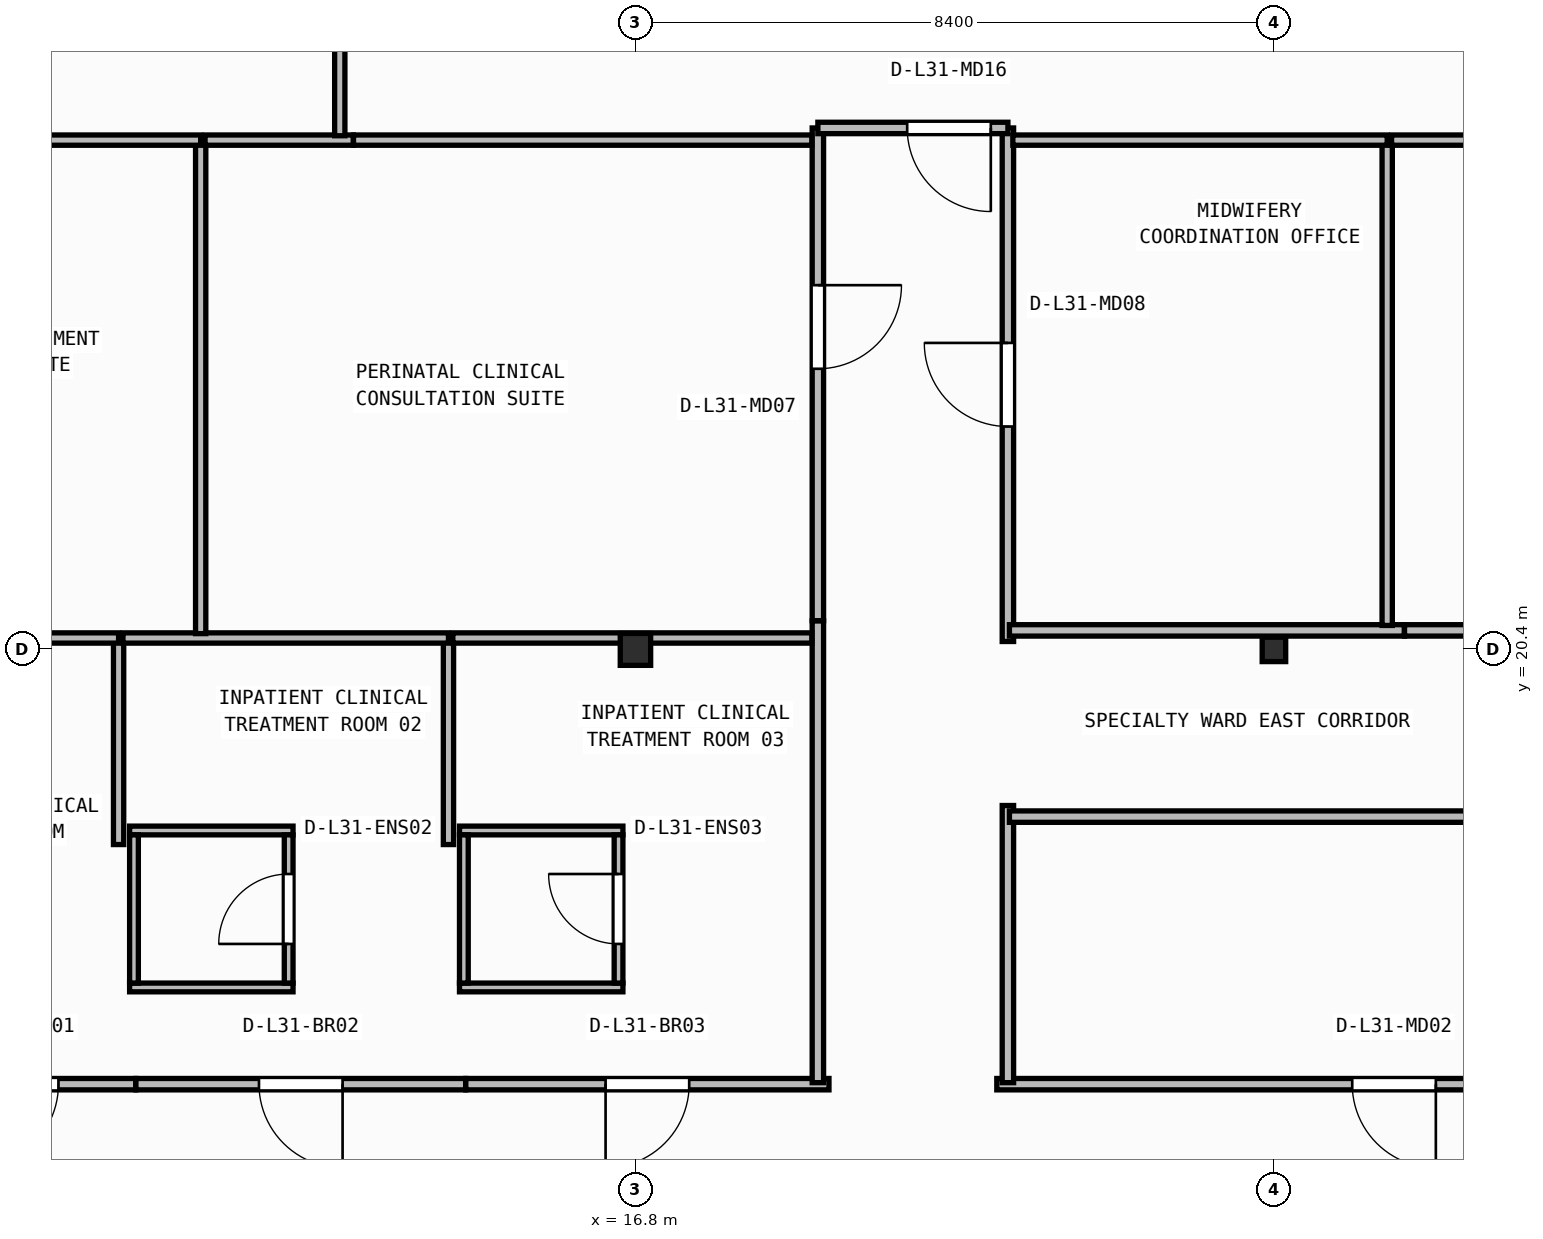
"""IFC4 building model, lengths in metres.
Left out: names, types, materials, properties, quantities, classifications, styles, units other than length and angle.
Written with IfcOpenShell. Run it as: python <this file> out.ifc"""

import sys

from ifc_helpers import new_model, si_unit, direction, frame, frame_2d, origin, origin_2d, place, context, subcontext, project, spatial, rectangle, i_section, extrude, element, fill, save


model = new_model("IFC4")
c1 = context("Model", 3, precision=1e-05, world=origin(), true_north=direction((0.0, 1.0)))
c2 = subcontext(c1, "Body", "Model", "MODEL_VIEW")
j1 = project(units=[si_unit("LENGTHUNIT", "METRE"), si_unit("PLANEANGLEUNIT", "RADIAN")], contexts=[c1])
p1 = place(None, origin())
s1 = spatial("IfcSite", under=j1, at=p1, CompositionType="ELEMENT")
p2 = place(p1, origin())
s2 = spatial("IfcBuilding", under=s1, at=p2, CompositionType="ELEMENT")
p3 = place(p2, frame((0.0, 0.0, 127.05)))
s3 = spatial("IfcBuildingStorey", under=s2, at=p3, CompositionType="ELEMENT", Elevation=127.05)
p4 = place(p3, frame((16.8, 20.4, 0.0), z_axis=(0.0, 0.0, 1.0), x_axis=(1.0, 0.0, 0.0)))
e1 = element("IfcColumn", 1, at=p4, inside=s3, PredefinedType="COLUMN", context=c2, shape_type="SweptSolid", body=[
    extrude(i_section(OverallWidth=0.4, OverallDepth=0.42, WebThickness=0.025, FlangeThickness=0.04, at=origin_2d()), origin(), (0.0, 0.0, 1.0), 3.95),
])
p5 = place(p3, frame((25.2, 20.4, 0.0), z_axis=(0.0, 0.0, 1.0), x_axis=(1.0, 0.0, 0.0)))
e2 = element("IfcColumn", 2, at=p5, inside=s3, PredefinedType="COLUMN", context=c2, shape_type="SweptSolid", body=[
    extrude(i_section(OverallWidth=0.309, OverallDepth=0.321, WebThickness=0.014, FlangeThickness=0.022, FilletRadius=0.017, at=origin_2d()), origin(), (0.0, 0.0, 1.0), 3.95),
])
for number, where, z_axis, x_axis in (
    (3, (10.145, 15.952, 0.0), (0.0, 0.0, 1.0), (1.0, 0.0, 0.0)),
    (4, (10.145, 18.018, 0.0), (0.0, 0.0, 1.0), (1.0, 0.0, 0.0)),
):
    element("IfcWall", number, at=place(p3, frame(where, z_axis=z_axis, x_axis=x_axis)), inside=s3, PredefinedType="PARTITIONING", context=c2, shape_type="SweptSolid", body=[
        extrude(rectangle(XDim=2.15, YDim=0.115, at=frame_2d((1.075, 0.0))), origin(), (0.0, 0.0, 1.0), 3.71),
    ])
p6 = place(p3, frame((10.202, 16.01, 0.0), z_axis=(0.0, 0.0, 1.0), x_axis=(0.0, 1.0, 0.0)))
e5 = element("IfcWall", 5, at=p6, inside=s3, PredefinedType="PARTITIONING", context=c2, shape_type="SweptSolid", body=[
    extrude(rectangle(XDim=1.95, YDim=0.115, at=frame_2d((0.975, 0.0))), origin(), (0.0, 0.0, 1.0), 3.71),
])
p7 = place(p3, frame((12.238, 16.01, 0.0), z_axis=(0.0, 0.0, 1.0), x_axis=(0.0, 1.0, 0.0)))
e6 = element("IfcWall", 6, at=p7, inside=s3, PredefinedType="PARTITIONING", context=c2, shape_type="SweptSolid", body=[
    extrude(rectangle(XDim=1.95, YDim=0.115, at=frame_2d((0.975, 0.0))), origin(), (0.0, 0.0, 1.0), 3.71),
])
p8 = place(p7, frame((0.515, 0.0, 0.0)))
e7 = element("IfcOpeningElement", 7, at=p8, cuts=e6, PredefinedType="OPENING", context=c2, shape_type="SweptSolid", body=[
    extrude(rectangle(XDim=0.92, YDim=2.1, at=frame_2d((0.46, 1.05))), frame((0.0, 0.067, 0.0), z_axis=(0.0, -1.0, 0.0), x_axis=(1.0, 0.0, 0.0)), (0.0, 0.0, 1.0), 0.135),
])
for number, where, z_axis, x_axis in (
    (8, (14.485, 15.952, 0.0), (0.0, 0.0, 1.0), (1.0, 0.0, 0.0)),
    (9, (14.485, 18.018, 0.0), (0.0, 0.0, 1.0), (1.0, 0.0, 0.0)),
):
    element("IfcWall", number, at=place(p3, frame(where, z_axis=z_axis, x_axis=x_axis)), inside=s3, PredefinedType="PARTITIONING", context=c2, shape_type="SweptSolid", body=[
        extrude(rectangle(XDim=2.15, YDim=0.115, at=frame_2d((1.075, 0.0))), origin(), (0.0, 0.0, 1.0), 3.71),
    ])
p9 = place(p3, frame((14.542, 16.01, 0.0), z_axis=(0.0, 0.0, 1.0), x_axis=(0.0, 1.0, 0.0)))
e10 = element("IfcWall", 10, at=p9, inside=s3, PredefinedType="PARTITIONING", context=c2, shape_type="SweptSolid", body=[
    extrude(rectangle(XDim=1.95, YDim=0.115, at=frame_2d((0.975, 0.0))), origin(), (0.0, 0.0, 1.0), 3.71),
])
p10 = place(p3, frame((16.577, 16.01, 0.0), z_axis=(0.0, 0.0, 1.0), x_axis=(0.0, 1.0, 0.0)))
e11 = element("IfcWall", 11, at=p10, inside=s3, PredefinedType="PARTITIONING", context=c2, shape_type="SweptSolid", body=[
    extrude(rectangle(XDim=1.95, YDim=0.115, at=frame_2d((0.975, 0.0))), origin(), (0.0, 0.0, 1.0), 3.71),
])
p11 = place(p10, frame((0.515, 0.0, 0.0)))
e12 = element("IfcOpeningElement", 12, at=p11, cuts=e11, PredefinedType="OPENING", context=c2, shape_type="SweptSolid", body=[
    extrude(rectangle(XDim=0.92, YDim=2.1, at=frame_2d((0.46, 1.05))), frame((0.0, 0.067, 0.0), z_axis=(0.0, -1.0, 0.0), x_axis=(1.0, 0.0, 0.0)), (0.0, 0.0, 1.0), 0.135),
])
p12 = place(p3, frame((10.226, 14.68, 0.0), z_axis=(0.0, 0.0, 1.0), x_axis=(-1.0, 0.0, 0.0)))
e13 = element("IfcWall", 13, at=p12, inside=s3, PredefinedType="PARTITIONING", context=c2, shape_type="SweptSolid", body=[
    extrude(rectangle(XDim=3.134, YDim=0.15, at=frame_2d((1.567, 0.0))), origin(), (0.0, 0.0, 1.0), 3.71),
])
p13 = place(p12, frame((1.017, 0.0, 0.0)))
e14 = element("IfcOpeningElement", 14, at=p13, cuts=e13, PredefinedType="OPENING", context=c2, shape_type="SweptSolid", body=[
    extrude(rectangle(XDim=1.1, YDim=2.1, at=frame_2d((0.55, 1.05))), frame((0.0, 0.085, 0.0), z_axis=(0.0, -1.0, 0.0), x_axis=(1.0, 0.0, 0.0)), (0.0, 0.0, 1.0), 0.17),
])
p14 = place(p3, frame((14.566, 14.68, 0.0), z_axis=(0.0, 0.0, 1.0), x_axis=(-1.0, 0.0, 0.0)))
e15 = element("IfcWall", 15, at=p14, inside=s3, PredefinedType="PARTITIONING", context=c2, shape_type="SweptSolid", body=[
    extrude(rectangle(XDim=4.338, YDim=0.15, at=frame_2d((2.169, 0.0))), origin(), (0.0, 0.0, 1.0), 3.71),
])
p15 = place(p14, frame((1.619, 0.0, 0.0)))
e16 = element("IfcOpeningElement", 16, at=p15, cuts=e15, PredefinedType="OPENING", context=c2, shape_type="SweptSolid", body=[
    extrude(rectangle(XDim=1.1, YDim=2.1, at=frame_2d((0.55, 1.05))), frame((0.0, 0.085, 0.0), z_axis=(0.0, -1.0, 0.0), x_axis=(1.0, 0.0, 0.0)), (0.0, 0.0, 1.0), 0.17),
])
p16 = place(p3, frame((19.346, 14.68, 0.0), z_axis=(0.0, 0.0, 1.0), x_axis=(-1.0, 0.0, 0.0)))
e17 = element("IfcWall", 17, at=p16, inside=s3, PredefinedType="PARTITIONING", context=c2, shape_type="SweptSolid", body=[
    extrude(rectangle(XDim=4.778, YDim=0.15, at=frame_2d((2.389, 0.0))), origin(), (0.0, 0.0, 1.0), 3.71),
])
p17 = place(p16, frame((1.839, 0.0, 0.0)))
e18 = element("IfcOpeningElement", 18, at=p17, cuts=e17, PredefinedType="OPENING", context=c2, shape_type="SweptSolid", body=[
    extrude(rectangle(XDim=1.1, YDim=2.1, at=frame_2d((0.55, 1.05))), frame((0.0, 0.085, 0.0), z_axis=(0.0, -1.0, 0.0), x_axis=(1.0, 0.0, 0.0)), (0.0, 0.0, 1.0), 0.17),
])
p18 = place(p3, frame((32.006, 14.68, 0.0), z_axis=(0.0, 0.0, 1.0), x_axis=(-1.0, 0.0, 0.0)))
e19 = element("IfcWall", 19, at=p18, inside=s3, PredefinedType="PARTITIONING", context=c2, shape_type="SweptSolid", body=[
    extrude(rectangle(XDim=10.452, YDim=0.15, at=frame_2d((5.226, 0.0))), origin(), (0.0, 0.0, 1.0), 3.71),
])
p19 = place(p18, frame((4.676, 0.0, 0.0)))
e20 = element("IfcOpeningElement", 20, at=p19, cuts=e19, PredefinedType="OPENING", context=c2, shape_type="SweptSolid", body=[
    extrude(rectangle(XDim=1.1, YDim=2.1, at=frame_2d((0.55, 1.05))), frame((0.0, 0.085, 0.0), z_axis=(0.0, -1.0, 0.0), x_axis=(1.0, 0.0, 0.0)), (0.0, 0.0, 1.0), 0.17),
])
p20 = place(p3, frame((19.2, 20.776, 0.0), z_axis=(0.0, 0.0, 1.0), x_axis=(0.0, -1.0, 0.0)))
e21 = element("IfcWall", 21, at=p20, inside=s3, PredefinedType="PARTITIONING", context=c2, shape_type="SweptSolid", body=[
    extrude(rectangle(XDim=6.076, YDim=0.15, at=frame_2d((3.038, 0.0))), origin(), (0.0, 0.0, 1.0), 3.71),
])
p21 = place(p3, frame((21.7, 14.7, 0.0), z_axis=(0.0, 0.0, 1.0), x_axis=(0.0, 1.0, 0.0)))
e22 = element("IfcWall", 22, at=p21, inside=s3, PredefinedType="PARTITIONING", context=c2, shape_type="SweptSolid", body=[
    extrude(rectangle(XDim=3.646, YDim=0.15, at=frame_2d((1.823, 0.0))), origin(), (0.0, 0.0, 1.0), 3.71),
])
p22 = place(p3, frame((19.2, 27.26, 0.0), z_axis=(0.0, 0.0, 1.0), x_axis=(0.0, -1.0, 0.0)))
e23 = element("IfcWall", 23, at=p22, inside=s3, PredefinedType="PARTITIONING", context=c2, shape_type="SweptSolid", body=[
    extrude(rectangle(XDim=6.482, YDim=0.15, at=frame_2d((3.241, 0.0))), origin(), (0.0, 0.0, 1.0), 3.71),
])
p23 = place(p22, frame((2.068, 0.0, 0.0)))
e24 = element("IfcOpeningElement", 24, at=p23, cuts=e23, PredefinedType="OPENING", context=c2, shape_type="SweptSolid", body=[
    extrude(rectangle(XDim=1.1, YDim=2.1, at=frame_2d((0.55, 1.05))), frame((0.0, 0.085, 0.0), z_axis=(0.0, -1.0, 0.0), x_axis=(1.0, 0.0, 0.0)), (0.0, 0.0, 1.0), 0.17),
])
p24 = place(p3, frame((21.7, 20.504, 0.0), z_axis=(0.0, 0.0, 1.0), x_axis=(0.0, 1.0, 0.0)))
e25 = element("IfcWall", 25, at=p24, inside=s3, PredefinedType="PARTITIONING", context=c2, shape_type="SweptSolid", body=[
    extrude(rectangle(XDim=6.756, YDim=0.15, at=frame_2d((3.378, 0.0))), origin(), (0.0, 0.0, 1.0), 3.71),
])
p25 = place(p24, frame((2.828, 0.0, 0.0)))
e26 = element("IfcOpeningElement", 26, at=p25, cuts=e25, PredefinedType="OPENING", context=c2, shape_type="SweptSolid", body=[
    extrude(rectangle(XDim=1.1, YDim=2.1, at=frame_2d((0.55, 1.05))), frame((0.0, 0.085, 0.0), z_axis=(0.0, -1.0, 0.0), x_axis=(1.0, 0.0, 0.0)), (0.0, 0.0, 1.0), 0.17),
])
p26 = place(p3, frame((21.7, 27.26, 0.0), z_axis=(0.0, 0.0, 1.0), x_axis=(-1.0, 0.0, 0.0)))
e27 = element("IfcWall", 27, at=p26, inside=s3, PredefinedType="PARTITIONING", context=c2, shape_type="SweptSolid", body=[
    extrude(rectangle(XDim=2.5, YDim=0.15, at=frame_2d((1.25, 0.0))), origin(), (0.0, 0.0, 1.0), 3.71),
])
p27 = place(p26, frame((0.225, 0.0, 0.0)))
e28 = element("IfcOpeningElement", 28, at=p27, cuts=e27, PredefinedType="OPENING", context=c2, shape_type="SweptSolid", body=[
    extrude(rectangle(XDim=1.1, YDim=2.1, at=frame_2d((0.55, 1.05))), frame((0.0, 0.085, 0.0), z_axis=(0.0, -1.0, 0.0), x_axis=(1.0, 0.0, 0.0)), (0.0, 0.0, 1.0), 0.17),
])
p28 = place(p3, frame((21.72, 18.2, 0.0), z_axis=(0.0, 0.0, 1.0), x_axis=(1.0, 0.0, 0.0)))
e29 = element("IfcWall", 29, at=p28, inside=s3, PredefinedType="PARTITIONING", context=c2, shape_type="SweptSolid", body=[
    extrude(rectangle(XDim=10.286, YDim=0.15, at=frame_2d((5.143, 0.0))), origin(), (0.0, 0.0, 1.0), 3.71),
])
p29 = place(p3, frame((26.916, 20.65, 0.0), z_axis=(0.0, 0.0, 1.0), x_axis=(-1.0, 0.0, 0.0)))
e30 = element("IfcWall", 30, at=p29, inside=s3, PredefinedType="PARTITIONING", context=c2, shape_type="SweptSolid", body=[
    extrude(rectangle(XDim=5.196, YDim=0.15, at=frame_2d((2.598, 0.0))), origin(), (0.0, 0.0, 1.0), 3.083),
])
p30 = place(p3, frame((32.286, 20.65, 0.0), z_axis=(0.0, 0.0, 1.0), x_axis=(-1.0, 0.0, 0.0)))
e31 = element("IfcWall", 31, at=p30, inside=s3, PredefinedType="PARTITIONING", context=c2, shape_type="SweptSolid", body=[
    extrude(rectangle(XDim=5.368, YDim=0.15, at=frame_2d((2.684, 0.0))), origin(), (0.0, 0.0, 1.0), 3.083),
])
p31 = place(p30, frame((2.327, 0.0, 0.0)))
e32 = element("IfcOpeningElement", 32, at=p31, cuts=e31, PredefinedType="OPENING", context=c2, shape_type="SweptSolid", body=[
    extrude(rectangle(XDim=1.1, YDim=2.1, at=frame_2d((0.55, 1.05))), frame((0.0, 0.085, 0.0), z_axis=(0.0, -1.0, 0.0), x_axis=(1.0, 0.0, 0.0)), (0.0, 0.0, 1.0), 0.17),
])
p32 = place(p3, frame((10.0, 17.833, 0.0), z_axis=(0.0, 0.0, 1.0), x_axis=(0.0, 1.0, 0.0)))
e33 = element("IfcWall", 33, at=p32, inside=s3, PredefinedType="PARTITIONING", context=c2, shape_type="SweptSolid", body=[
    extrude(rectangle(XDim=2.718, YDim=0.135, at=frame_2d((1.359, 0.0))), origin(), (0.0, 0.0, 1.0), 3.71),
])
p33 = place(p3, frame((10.0, 20.55, 0.0), z_axis=(0.0, 0.0, 1.0), x_axis=(-1.0, 0.0, 0.0)))
e34 = element("IfcWall", 34, at=p33, inside=s3, PredefinedType="PARTITIONING", context=c2, shape_type="SweptSolid", body=[
    extrude(rectangle(XDim=5.042, YDim=0.135, at=frame_2d((2.521, 0.0))), origin(), (0.0, 0.0, 1.0), 3.083),
])
p34 = place(p33, frame((3.654, 0.0, 0.0)))
e35 = element("IfcOpeningElement", 35, at=p34, cuts=e34, PredefinedType="OPENING", context=c2, shape_type="SweptSolid", body=[
    extrude(rectangle(XDim=1.1, YDim=2.1, at=frame_2d((0.55, 1.05))), frame((0.0, 0.077, 0.0), z_axis=(0.0, -1.0, 0.0), x_axis=(1.0, 0.0, 0.0)), (0.0, 0.0, 1.0), 0.155),
])
p35 = place(p3, frame((14.34, 17.833, 0.0), z_axis=(0.0, 0.0, 1.0), x_axis=(0.0, 1.0, 0.0)))
e36 = element("IfcWall", 36, at=p35, inside=s3, PredefinedType="PARTITIONING", context=c2, shape_type="SweptSolid", body=[
    extrude(rectangle(XDim=2.718, YDim=0.135, at=frame_2d((1.359, 0.0))), origin(), (0.0, 0.0, 1.0), 3.71),
])
p36 = place(p3, frame((14.34, 20.55, 0.0), z_axis=(0.0, 0.0, 1.0), x_axis=(-1.0, 0.0, 0.0)))
e37 = element("IfcWall", 37, at=p36, inside=s3, PredefinedType="PARTITIONING", context=c2, shape_type="SweptSolid", body=[
    extrude(rectangle(XDim=4.282, YDim=0.135, at=frame_2d((2.141, 0.0))), origin(), (0.0, 0.0, 1.0), 3.083),
])
p37 = place(p3, frame((19.12, 20.55, 0.0), z_axis=(0.0, 0.0, 1.0), x_axis=(-1.0, 0.0, 0.0)))
e38 = element("IfcWall", 38, at=p37, inside=s3, PredefinedType="PARTITIONING", context=c2, shape_type="SweptSolid", body=[
    extrude(rectangle(XDim=4.723, YDim=0.135, at=frame_2d((2.361, 0.0))), origin(), (0.0, 0.0, 1.0), 3.083),
])
p38 = place(p3, frame((11.08, 20.607, 0.0), z_axis=(0.0, 0.0, 1.0), x_axis=(0.0, 1.0, 0.0)))
e39 = element("IfcWall", 39, at=p38, inside=s3, PredefinedType="PARTITIONING", context=c2, shape_type="SweptSolid", body=[
    extrude(rectangle(XDim=6.493, YDim=0.135, at=frame_2d((3.246, 0.0))), origin(), (0.0, 0.0, 1.0), 3.71),
])
p39 = place(p3, frame((11.08, 27.1, 0.0), z_axis=(0.0, 0.0, 1.0), x_axis=(-1.0, 0.0, 0.0)))
e40 = element("IfcWall", 40, at=p39, inside=s3, PredefinedType="PARTITIONING", context=c2, shape_type="SweptSolid", body=[
    extrude(rectangle(XDim=6.532, YDim=0.135, at=frame_2d((3.266, 0.0))), origin(), (0.0, 0.0, 1.0), 3.71),
])
p40 = place(p3, frame((13.088, 27.1, 0.0), z_axis=(0.0, 0.0, 1.0), x_axis=(-1.0, 0.0, 0.0)))
e41 = element("IfcWall", 41, at=p40, inside=s3, PredefinedType="PARTITIONING", context=c2, shape_type="SweptSolid", body=[
    extrude(rectangle(XDim=1.951, YDim=0.135, at=frame_2d((0.976, 0.0))), origin(), (0.0, 0.0, 1.0), 3.71),
])
p41 = place(p3, frame((19.12, 27.1, 0.0), z_axis=(0.0, 0.0, 1.0), x_axis=(-1.0, 0.0, 0.0)))
e42 = element("IfcWall", 42, at=p41, inside=s3, PredefinedType="PARTITIONING", context=c2, shape_type="SweptSolid", body=[
    extrude(rectangle(XDim=6.03, YDim=0.135, at=frame_2d((3.015, 0.0))), origin(), (0.0, 0.0, 1.0), 3.71),
])
p42 = place(p3, frame((26.69, 20.715, 0.0), z_axis=(0.0, 0.0, 1.0), x_axis=(0.0, 1.0, 0.0)))
e43 = element("IfcWall", 43, at=p42, inside=s3, PredefinedType="PARTITIONING", context=c2, shape_type="SweptSolid", body=[
    extrude(rectangle(XDim=6.385, YDim=0.135, at=frame_2d((3.192, 0.0))), origin(), (0.0, 0.0, 1.0), 3.71),
])
p43 = place(p3, frame((26.69, 27.1, 0.0), z_axis=(0.0, 0.0, 1.0), x_axis=(-1.0, 0.0, 0.0)))
e44 = element("IfcWall", 44, at=p43, inside=s3, PredefinedType="PARTITIONING", context=c2, shape_type="SweptSolid", body=[
    extrude(rectangle(XDim=4.925, YDim=0.135, at=frame_2d((2.462, 0.0))), origin(), (0.0, 0.0, 1.0), 3.71),
])
p44 = place(p3, frame((28.519, 27.1, 0.0), z_axis=(0.0, 0.0, 1.0), x_axis=(-1.0, 0.0, 0.0)))
e45 = element("IfcWall", 45, at=p44, inside=s3, PredefinedType="PARTITIONING", context=c2, shape_type="SweptSolid", body=[
    extrude(rectangle(XDim=1.771, YDim=0.135, at=frame_2d((0.885, 0.0))), origin(), (0.0, 0.0, 1.0), 3.71),
])
p45 = place(p3, frame((12.91, 27.157, 0.0), z_axis=(0.0, 0.0, 1.0), x_axis=(0.0, 1.0, 0.0)))
e46 = element("IfcWall", 46, at=p45, inside=s3, PredefinedType="PARTITIONING", context=c2, shape_type="SweptSolid", body=[
    extrude(rectangle(XDim=9.553, YDim=0.135, at=frame_2d((4.776, 0.0))), origin(), (0.0, 0.0, 1.0), 3.71),
])
p46 = place(p8, origin())
e47 = element("IfcDoor", 47, at=p46, inside=s3, OperationType="SINGLE_SWING_LEFT", PredefinedType="DOOR", context=c2, shape_type="SweptSolid", body=[
    extrude(rectangle(XDim=0.92, YDim=2.1, at=frame_2d((0.46, 1.05))), frame((0.0, 0.025, 0.0), z_axis=(0.0, -1.0, 0.0), x_axis=(1.0, 0.0, 0.0)), (0.0, 0.0, 1.0), 0.05),
])
fill(e7, e47)
p47 = place(p11, origin())
e48 = element("IfcDoor", 48, at=p47, inside=s3, OperationType="SINGLE_SWING_RIGHT", PredefinedType="DOOR", context=c2, shape_type="SweptSolid", body=[
    extrude(rectangle(XDim=0.92, YDim=2.1, at=frame_2d((0.46, 1.05))), frame((0.0, 0.025, 0.0), z_axis=(0.0, -1.0, 0.0), x_axis=(1.0, 0.0, 0.0)), (0.0, 0.0, 1.0), 0.05),
])
fill(e12, e48)
p48 = place(p13, origin())
e49 = element("IfcDoor", 49, at=p48, inside=s3, OperationType="SINGLE_SWING_RIGHT", PredefinedType="DOOR", context=c2, shape_type="SweptSolid", body=[
    extrude(rectangle(XDim=1.1, YDim=2.1, at=frame_2d((0.55, 1.05))), frame((0.0, 0.025, 0.0), z_axis=(0.0, -1.0, 0.0), x_axis=(1.0, 0.0, 0.0)), (0.0, 0.0, 1.0), 0.05),
])
fill(e14, e49)
p49 = place(p15, origin())
e50 = element("IfcDoor", 50, at=p49, inside=s3, OperationType="SINGLE_SWING_LEFT", PredefinedType="DOOR", context=c2, shape_type="SweptSolid", body=[
    extrude(rectangle(XDim=1.1, YDim=2.1, at=frame_2d((0.55, 1.05))), frame((0.0, 0.025, 0.0), z_axis=(0.0, -1.0, 0.0), x_axis=(1.0, 0.0, 0.0)), (0.0, 0.0, 1.0), 0.05),
])
fill(e16, e50)
p50 = place(p17, origin())
e51 = element("IfcDoor", 51, at=p50, inside=s3, OperationType="SINGLE_SWING_RIGHT", PredefinedType="DOOR", context=c2, shape_type="SweptSolid", body=[
    extrude(rectangle(XDim=1.1, YDim=2.1, at=frame_2d((0.55, 1.05))), frame((0.0, 0.025, 0.0), z_axis=(0.0, -1.0, 0.0), x_axis=(1.0, 0.0, 0.0)), (0.0, 0.0, 1.0), 0.05),
])
fill(e18, e51)
p51 = place(p19, origin())
e52 = element("IfcDoor", 52, at=p51, inside=s3, OperationType="SINGLE_SWING_LEFT", PredefinedType="DOOR", context=c2, shape_type="SweptSolid", body=[
    extrude(rectangle(XDim=1.1, YDim=2.1, at=frame_2d((0.55, 1.05))), frame((0.0, 0.025, 0.0), z_axis=(0.0, -1.0, 0.0), x_axis=(1.0, 0.0, 0.0)), (0.0, 0.0, 1.0), 0.05),
])
fill(e20, e52)
p52 = place(p23, origin())
e53 = element("IfcDoor", 53, at=p52, inside=s3, OperationType="SINGLE_SWING_LEFT", PredefinedType="DOOR", context=c2, shape_type="SweptSolid", body=[
    extrude(rectangle(XDim=1.1, YDim=2.1, at=frame_2d((0.55, 1.05))), frame((0.0, 0.025, 0.0), z_axis=(0.0, -1.0, 0.0), x_axis=(1.0, 0.0, 0.0)), (0.0, 0.0, 1.0), 0.05),
])
fill(e24, e53)
p53 = place(p25, origin())
e54 = element("IfcDoor", 54, at=p53, inside=s3, OperationType="SINGLE_SWING_RIGHT", PredefinedType="DOOR", context=c2, shape_type="SweptSolid", body=[
    extrude(rectangle(XDim=1.1, YDim=2.1, at=frame_2d((0.55, 1.05))), frame((0.0, 0.025, 0.0), z_axis=(0.0, -1.0, 0.0), x_axis=(1.0, 0.0, 0.0)), (0.0, 0.0, 1.0), 0.05),
])
fill(e26, e54)
p54 = place(p27, origin())
e55 = element("IfcDoor", 55, at=p54, inside=s3, OperationType="SINGLE_SWING_LEFT", PredefinedType="DOOR", context=c2, shape_type="SweptSolid", body=[
    extrude(rectangle(XDim=1.1, YDim=2.1, at=frame_2d((0.55, 1.05))), frame((0.0, 0.025, 0.0), z_axis=(0.0, -1.0, 0.0), x_axis=(1.0, 0.0, 0.0)), (0.0, 0.0, 1.0), 0.05),
])
fill(e28, e55)
save(model, sys.argv[1])
